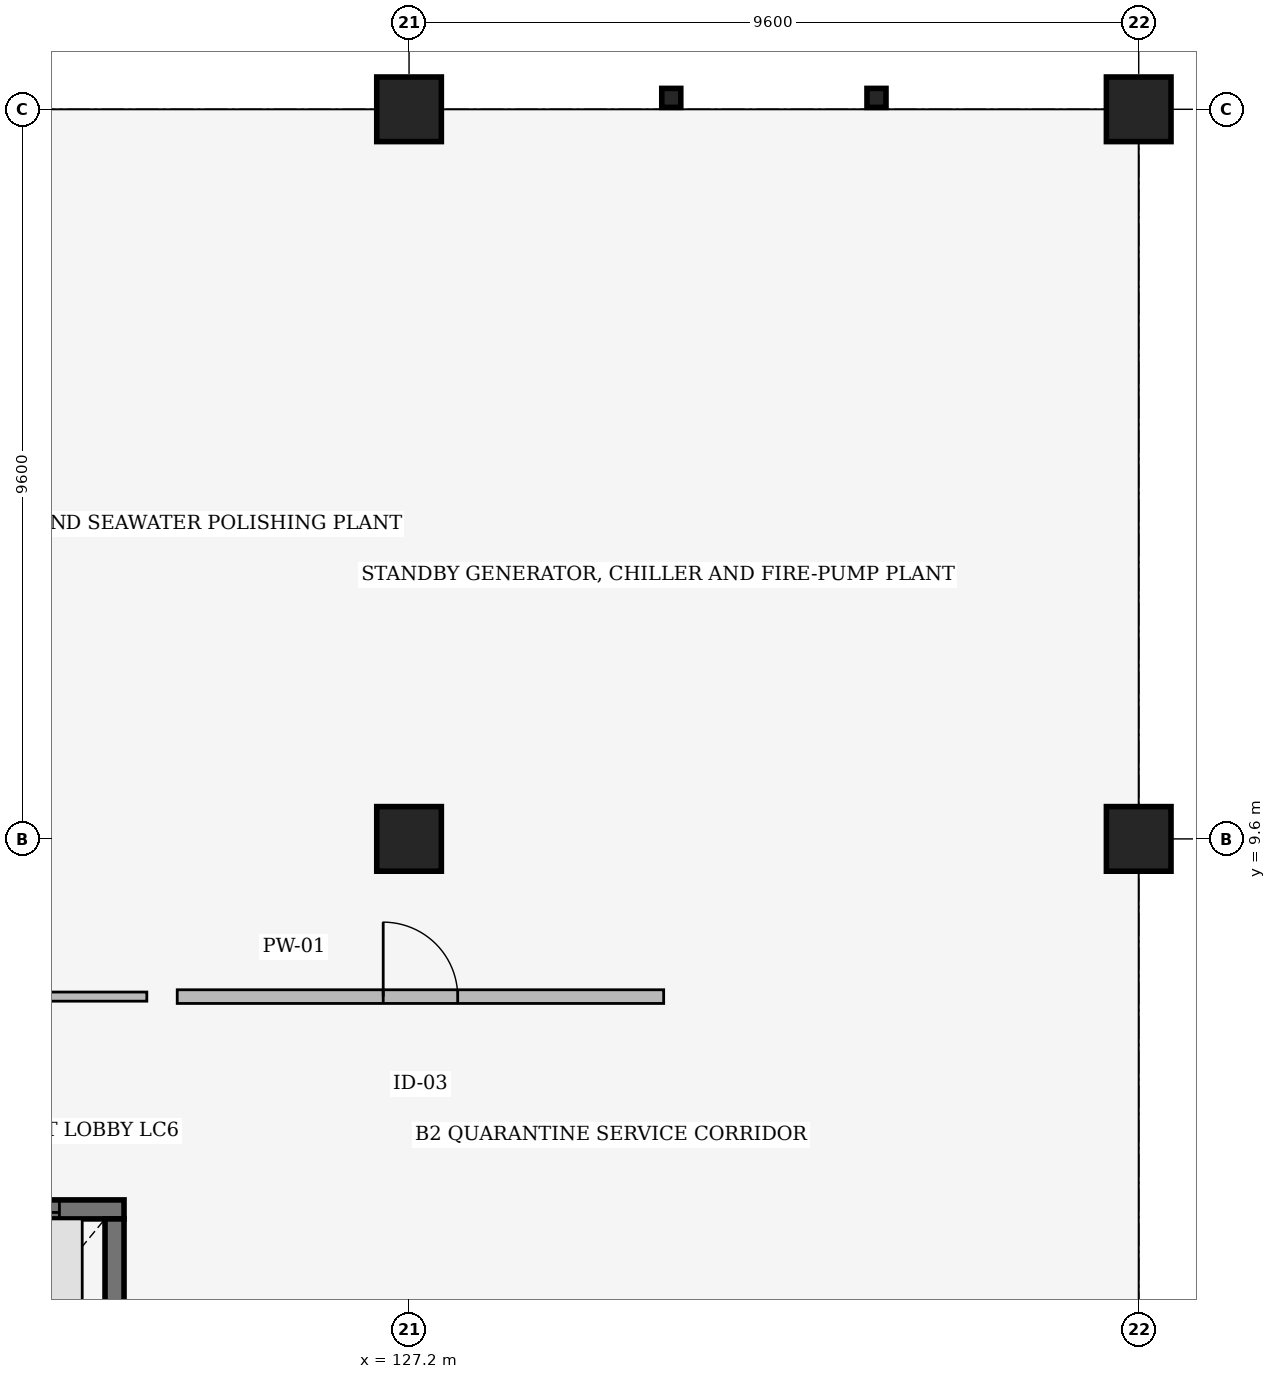
"""IFC4 building model, lengths in metres.
Left out: names, types, materials, properties, quantities, classifications, styles, units other than length and angle.
Written with IfcOpenShell. Run it as: python <this file> out.ifc"""

import sys

from ifc_helpers import new_model, si_unit, direction, frame, frame_2d, origin, origin_2d, place, context, subcontext, project, spatial, rectangle, hollow_rectangle, extrude, element, fill, save


model = new_model("IFC4")
c1 = context("Model", 3, precision=1e-05, world=origin(), true_north=direction((0.0, 1.0)))
c2 = subcontext(c1, "Body", "Model", "MODEL_VIEW")
j1 = project(units=[si_unit("LENGTHUNIT", "METRE"), si_unit("PLANEANGLEUNIT", "RADIAN")], contexts=[c1])
p1 = place(None, origin())
s1 = spatial("IfcSite", under=j1, at=p1, CompositionType="ELEMENT")
p2 = place(p1, origin())
s2 = spatial("IfcBuilding", under=s1, at=p2, CompositionType="ELEMENT")
p3 = place(p2, frame((0.0, 0.0, -9.6)))
s3 = spatial("IfcBuildingStorey", under=s2, at=p3, CompositionType="ELEMENT", Elevation=-9.6)
for number, where, z_axis, x_axis in (
    (1, (127.2, 9.6, 0.0), (0.0, 0.0, 1.0), (1.0, 0.0, 0.0)),
    (2, (127.2, 19.2, 0.0), (0.0, 0.0, 1.0), (1.0, 0.0, 0.0)),
    (3, (136.8, 9.6, 0.0), (0.0, 0.0, 1.0), (1.0, 0.0, 0.0)),
    (4, (136.8, 19.2, 0.0), (0.0, 0.0, 1.0), (1.0, 0.0, 0.0)),
):
    element("IfcColumn", number, at=place(p3, frame(where, z_axis=z_axis, x_axis=x_axis)), inside=s3, PredefinedType="COLUMN", context=c2, shape_type="SweptSolid", body=[
        extrude(rectangle(XDim=0.85, YDim=0.85, at=origin_2d()), origin(), (0.0, 0.0, 1.0), 4.8),
    ])
for number, where, z_axis, x_axis in (
    (5, (130.65, 19.35, 0.0), (0.0, 0.0, 1.0), (1.0, 0.0, 0.0)),
    (6, (133.35, 19.35, 0.0), (0.0, 0.0, 1.0), (1.0, 0.0, 0.0)),
):
    element("IfcColumn", number, at=place(p3, frame(where, z_axis=z_axis, x_axis=x_axis)), inside=s3, PredefinedType="COLUMN", context=c2, shape_type="SweptSolid", body=[
        extrude(hollow_rectangle(XDim=0.25, YDim=0.25, WallThickness=0.012, InnerFilletRadius=0.012, OuterFilletRadius=0.025, at=origin_2d()), origin(), (0.0, 0.0, 1.0), 4.8),
    ])
p4 = place(p3, frame((120.15, 4.725, 0.0), z_axis=(0.0, 0.0, 1.0), x_axis=(1.0, 0.0, 0.0)))
e7 = element("IfcWall", 7, at=p4, inside=s3, PredefinedType="SHEAR", context=c2, shape_type="SweptSolid", body=[
    extrude(rectangle(XDim=3.3, YDim=0.25, at=frame_2d((1.65, 0.0))), origin(), (0.0, 0.0, 1.0), 4.45),
])
p5 = place(p4, frame((0.85, 0.0, 0.0)))
e8 = element("IfcOpeningElement", 8, at=p5, cuts=e7, PredefinedType="OPENING", context=c2, shape_type="SweptSolid", body=[
    extrude(rectangle(XDim=1.6, YDim=2.3, at=frame_2d((0.8, 1.15))), frame((0.0, 0.135, 0.0), z_axis=(0.0, -1.0, 0.0), x_axis=(1.0, 0.0, 0.0)), (0.0, 0.0, 1.0), 0.27),
])
p6 = place(p3, frame((123.325, 1.2, 0.0), z_axis=(0.0, 0.0, 1.0), x_axis=(0.0, 1.0, 0.0)))
e9 = element("IfcWall", 9, at=p6, inside=s3, PredefinedType="SHEAR", context=c2, shape_type="SweptSolid", body=[
    extrude(rectangle(XDim=3.4, YDim=0.25, at=frame_2d((1.7, 0.0))), origin(), (0.0, 0.0, 1.0), 4.45),
])
p7 = place(p3, frame((120.05, 7.525, 0.0), z_axis=(0.0, 0.0, 1.0), x_axis=(1.0, 0.0, 0.0)))
e10 = element("IfcWall", 10, at=p7, inside=s3, PredefinedType="PARTITIONING", context=c2, shape_type="SweptSolid", body=[
    extrude(rectangle(XDim=3.7, YDim=0.12, at=frame_2d((1.85, 0.0))), origin(), (0.0, 0.0, 1.0), 3.999),
])
p8 = place(p7, frame((1.375, 0.0, 0.0)))
e11 = element("IfcOpeningElement", 11, at=p8, cuts=e10, PredefinedType="OPENING", context=c2, shape_type="SweptSolid", body=[
    extrude(rectangle(XDim=0.95, YDim=2.15, at=frame_2d((0.475, 1.075))), frame((0.0, 0.07, 0.0), z_axis=(0.0, -1.0, 0.0), x_axis=(1.0, 0.0, 0.0)), (0.0, 0.0, 1.0), 0.14),
])
p9 = place(p3, frame((124.15, 7.525, 0.0), z_axis=(0.0, 0.0, 1.0), x_axis=(1.0, 0.0, 0.0)))
e12 = element("IfcWall", 12, at=p9, inside=s3, PredefinedType="PARTITIONING", context=c2, shape_type="SweptSolid", body=[
    extrude(rectangle(XDim=6.4, YDim=0.18, at=frame_2d((3.2, 0.0))), origin(), (0.0, 0.0, 1.0), 3.216),
])
p10 = place(p9, frame((2.71, 0.0, 0.0)))
e13 = element("IfcOpeningElement", 13, at=p10, cuts=e12, PredefinedType="OPENING", context=c2, shape_type="SweptSolid", body=[
    extrude(rectangle(XDim=0.98, YDim=2.15, at=frame_2d((0.49, 1.075))), frame((0.0, 0.1, 0.0), z_axis=(0.0, -1.0, 0.0), x_axis=(1.0, 0.0, 0.0)), (0.0, 0.0, 1.0), 0.2),
])
p11 = place(p5, origin())
e14 = element("IfcDoor", 14, at=p11, inside=s3, OperationType="DOUBLE_DOOR_SLIDING", PredefinedType="DOOR", context=c2, shape_type="SweptSolid", body=[
    extrude(rectangle(XDim=1.6, YDim=2.3, at=frame_2d((0.8, 1.15))), frame((0.0, 0.025, 0.0), z_axis=(0.0, -1.0, 0.0), x_axis=(1.0, 0.0, 0.0)), (0.0, 0.0, 1.0), 0.05),
])
fill(e8, e14)
p12 = place(p10, origin())
e15 = element("IfcDoor", 15, at=p12, inside=s3, OperationType="SINGLE_SWING_LEFT", PredefinedType="DOOR", context=c2, shape_type="SweptSolid", body=[
    extrude(rectangle(XDim=0.98, YDim=2.15, at=frame_2d((0.49, 1.075))), frame((0.0, 0.025, 0.0), z_axis=(0.0, -1.0, 0.0), x_axis=(1.0, 0.0, 0.0)), (0.0, 0.0, 1.0), 0.05),
])
fill(e13, e15)
save(model, sys.argv[1])
